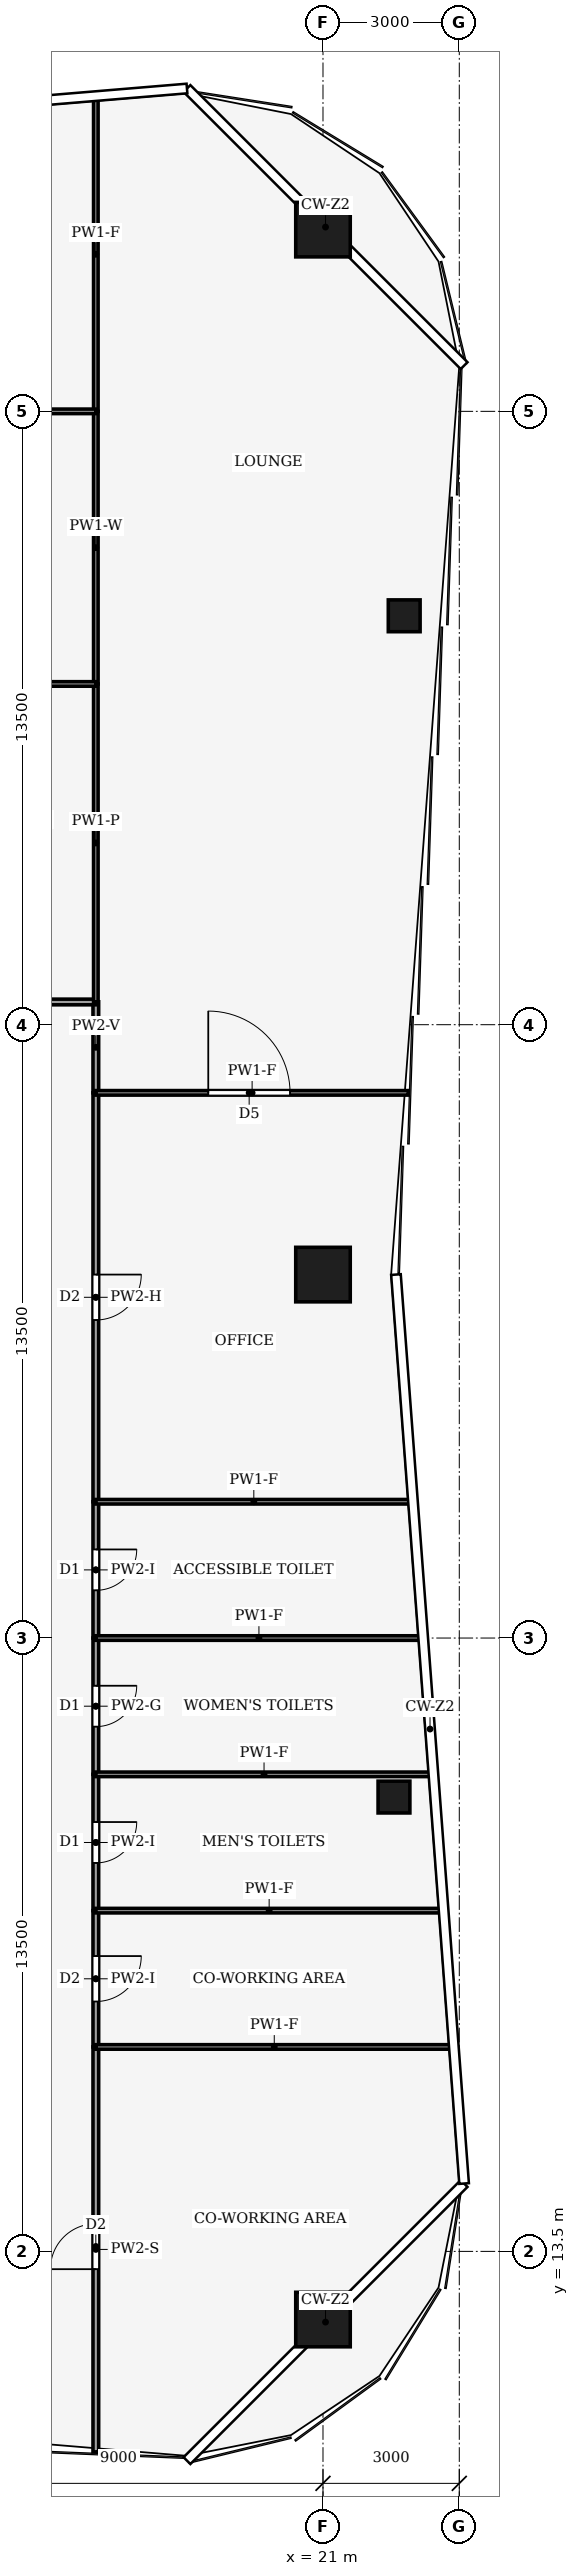
"""IFC4 building model, lengths in metres.
Left out: names, types, materials, properties, quantities, classifications, styles, units other than length and angle.
Written with IfcOpenShell. Run it as: python <this file> out.ifc"""

import sys

from ifc_helpers import new_model, si_unit, direction, frame, frame_2d, origin, origin_2d, place, context, subcontext, project, spatial, rectangle, hollow_rectangle, extrude, element, fill, save


model = new_model("IFC4")
c1 = context("Model", 3, precision=1e-05, world=origin(), true_north=direction((0.0, 1.0)))
c2 = subcontext(c1, "Body", "Model", "MODEL_VIEW")
j1 = project(units=[si_unit("LENGTHUNIT", "METRE"), si_unit("PLANEANGLEUNIT", "RADIAN")], contexts=[c1])
p1 = place(None, origin())
s1 = spatial("IfcSite", under=j1, at=p1, CompositionType="ELEMENT")
p2 = place(p1, origin())
s2 = spatial("IfcBuilding", under=s1, at=p2, CompositionType="ELEMENT")
p3 = place(p2, frame((0.0, 0.0, 154.0)))
s3 = spatial("IfcBuildingStorey", under=s2, at=p3, CompositionType="ELEMENT", Elevation=154.0)
for number, where, z_axis, x_axis in (
    (1, (21.0, 58.0, 0.0), (0.0, 0.0, 1.0), (1.0, 0.0, 0.0)),
    (2, (21.0, 35.0, 0.0), (0.0, 0.0, 1.0), (1.0, 0.0, 0.0)),
    (3, (21.0, 12.0, 0.0), (0.0, 0.0, 1.0), (1.0, 0.0, 0.0)),
):
    element("IfcColumn", number, at=place(p3, frame(where, z_axis=z_axis, x_axis=x_axis)), inside=s3, PredefinedType="COLUMN", context=c2, shape_type="SweptSolid", body=[
        extrude(hollow_rectangle(XDim=1.2, YDim=1.2, WallThickness=0.07, at=origin_2d()), origin(), (0.0, 0.0, 1.0), 4.0),
    ])
for number, where, z_axis, x_axis in (
    (4, (22.562, 23.5, 0.0), (0.0, 0.0, 1.0), (1.0, 0.0, 0.0)),
    (5, (22.788, 49.5, 0.0), (0.0, 0.0, 1.0), (1.0, 0.0, 0.0)),
):
    element("IfcColumn", number, at=place(p3, frame(where, z_axis=z_axis, x_axis=x_axis)), inside=s3, PredefinedType="COLUMN", context=c2, shape_type="SweptSolid", body=[
        extrude(hollow_rectangle(XDim=0.7, YDim=0.7, WallThickness=0.03, at=origin_2d()), origin(), (0.0, 0.0, 1.0), 4.0),
    ])
p4 = place(p3, frame((16.0, 9.087, 0.0), z_axis=(0.0, 0.0, 1.0), x_axis=(0.0, 1.0, 0.0)))
e6 = element("IfcWall", 6, at=p4, inside=s3, PredefinedType="PARTITIONING", context=c2, shape_type="SweptSolid", body=[
    extrude(rectangle(XDim=8.913, YDim=0.125, at=frame_2d((4.457, 0.0))), origin(), (0.0, 0.0, 1.0), 3.04),
])
p5 = place(p4, frame((4.022, 0.0, 0.0)))
e7 = element("IfcOpeningElement", 7, at=p5, cuts=e6, PredefinedType="OPENING", context=c2, shape_type="SweptSolid", body=[
    extrude(rectangle(XDim=1.0, YDim=2.1, at=frame_2d((0.5, 1.05))), frame((0.0, 0.073, 0.0), z_axis=(0.0, -1.0, 0.0), x_axis=(1.0, 0.0, 0.0)), (0.0, 0.0, 1.0), 0.145),
])
p6 = place(p3, frame((16.0, 21.0, 0.0), z_axis=(0.0, 0.0, 1.0), x_axis=(0.0, -1.0, 0.0)))
e8 = element("IfcWall", 8, at=p6, inside=s3, PredefinedType="PARTITIONING", context=c2, shape_type="SweptSolid", body=[
    extrude(rectangle(XDim=3.0, YDim=0.125, at=frame_2d((1.5, 0.0))), origin(), (0.0, 0.0, 1.0), 3.48),
])
p7 = place(p6, frame((1.0, 0.0, 0.0)))
e9 = element("IfcOpeningElement", 9, at=p7, cuts=e8, PredefinedType="OPENING", context=c2, shape_type="SweptSolid", body=[
    extrude(rectangle(XDim=1.0, YDim=2.1, at=frame_2d((0.5, 1.05))), frame((0.0, 0.073, 0.0), z_axis=(0.0, -1.0, 0.0), x_axis=(1.0, 0.0, 0.0)), (0.0, 0.0, 1.0), 0.145),
])
p8 = place(p3, frame((16.0, 24.0, 0.0), z_axis=(0.0, 0.0, 1.0), x_axis=(0.0, -1.0, 0.0)))
e10 = element("IfcWall", 10, at=p8, inside=s3, PredefinedType="PARTITIONING", context=c2, shape_type="SweptSolid", body=[
    extrude(rectangle(XDim=3.0, YDim=0.125, at=frame_2d((1.5, 0.0))), origin(), (0.0, 0.0, 1.0), 3.48),
])
p9 = place(p8, frame((1.05, 0.0, 0.0)))
e11 = element("IfcOpeningElement", 11, at=p9, cuts=e10, PredefinedType="OPENING", context=c2, shape_type="SweptSolid", body=[
    extrude(rectangle(XDim=0.9, YDim=2.1, at=frame_2d((0.45, 1.05))), frame((0.0, 0.073, 0.0), z_axis=(0.0, -1.0, 0.0), x_axis=(1.0, 0.0, 0.0)), (0.0, 0.0, 1.0), 0.145),
])
p10 = place(p3, frame((16.0, 27.0, 0.0), z_axis=(0.0, 0.0, 1.0), x_axis=(0.0, -1.0, 0.0)))
e12 = element("IfcWall", 12, at=p10, inside=s3, PredefinedType="PARTITIONING", context=c2, shape_type="SweptSolid", body=[
    extrude(rectangle(XDim=3.0, YDim=0.125, at=frame_2d((1.5, 0.0))), origin(), (0.0, 0.0, 1.0), 3.87),
])
p11 = place(p10, frame((1.05, 0.0, 0.0)))
e13 = element("IfcOpeningElement", 13, at=p11, cuts=e12, PredefinedType="OPENING", context=c2, shape_type="SweptSolid", body=[
    extrude(rectangle(XDim=0.9, YDim=2.1, at=frame_2d((0.45, 1.05))), frame((0.0, 0.073, 0.0), z_axis=(0.0, -1.0, 0.0), x_axis=(1.0, 0.0, 0.0)), (0.0, 0.0, 1.0), 0.145),
])
p12 = place(p3, frame((16.0, 30.0, 0.0), z_axis=(0.0, 0.0, 1.0), x_axis=(0.0, -1.0, 0.0)))
e14 = element("IfcWall", 14, at=p12, inside=s3, PredefinedType="PARTITIONING", context=c2, shape_type="SweptSolid", body=[
    extrude(rectangle(XDim=3.0, YDim=0.125, at=frame_2d((1.5, 0.0))), origin(), (0.0, 0.0, 1.0), 3.48),
])
p13 = place(p12, frame((1.05, 0.0, 0.0)))
e15 = element("IfcOpeningElement", 15, at=p13, cuts=e14, PredefinedType="OPENING", context=c2, shape_type="SweptSolid", body=[
    extrude(rectangle(XDim=0.9, YDim=2.1, at=frame_2d((0.45, 1.05))), frame((0.0, 0.073, 0.0), z_axis=(0.0, -1.0, 0.0), x_axis=(1.0, 0.0, 0.0)), (0.0, 0.0, 1.0), 0.145),
])
p14 = place(p3, frame((16.0, 39.0, 0.0), z_axis=(0.0, 0.0, 1.0), x_axis=(0.0, -1.0, 0.0)))
e16 = element("IfcWall", 16, at=p14, inside=s3, PredefinedType="PARTITIONING", context=c2, shape_type="SweptSolid", body=[
    extrude(rectangle(XDim=9.0, YDim=0.125, at=frame_2d((4.5, 0.0))), origin(), (0.0, 0.0, 1.0), 3.14),
])
p15 = place(p14, frame((4.0, 0.0, 0.0)))
e17 = element("IfcOpeningElement", 17, at=p15, cuts=e16, PredefinedType="OPENING", context=c2, shape_type="SweptSolid", body=[
    extrude(rectangle(XDim=1.0, YDim=2.1, at=frame_2d((0.5, 1.05))), frame((0.0, 0.073, 0.0), z_axis=(0.0, -1.0, 0.0), x_axis=(1.0, 0.0, 0.0)), (0.0, 0.0, 1.0), 0.145),
])
p16 = place(p3, frame((16.0, 39.0, 0.0), z_axis=(0.0, 0.0, 1.0), x_axis=(0.0, 1.0, 0.0)))
e18 = element("IfcWall", 18, at=p16, inside=s3, PredefinedType="PARTITIONING", context=c2, shape_type="SweptSolid", body=[
    extrude(rectangle(XDim=2.004, YDim=0.125, at=frame_2d((1.002, 0.0))), origin(), (0.0, 0.0, 1.0), 3.44),
])
p17 = place(p3, frame((16.0, 41.0, 0.0), z_axis=(0.0, 0.0, 1.0), x_axis=(-1.0, 0.0, 0.0)))
e19 = element("IfcWall", 19, at=p17, inside=s3, PredefinedType="PARTITIONING", context=c2, shape_type="SweptSolid", body=[
    extrude(rectangle(XDim=4.0, YDim=0.125, at=frame_2d((2.0, 0.0))), origin(), (0.0, 0.0, 1.0), 3.44),
])
p18 = place(p3, frame((23.855, 18.0, 0.0), z_axis=(0.0, 0.0, 1.0), x_axis=(-1.0, 0.0, 0.0)))
e20 = element("IfcWall", 20, at=p18, inside=s3, PredefinedType="PARTITIONING", context=c2, shape_type="SweptSolid", body=[
    extrude(rectangle(XDim=7.855, YDim=0.1, at=frame_2d((3.927, 0.0))), origin(), (0.0, 0.0, 1.0), 3.04),
])
p19 = place(p3, frame((23.63, 21.0, 0.0), z_axis=(0.0, 0.0, 1.0), x_axis=(-1.0, 0.0, 0.0)))
e21 = element("IfcWall", 21, at=p19, inside=s3, PredefinedType="PARTITIONING", context=c2, shape_type="SweptSolid", body=[
    extrude(rectangle(XDim=7.63, YDim=0.1, at=frame_2d((3.815, 0.0))), origin(), (0.0, 0.0, 1.0), 3.04),
])
p20 = place(p3, frame((23.405, 24.0, 0.0), z_axis=(0.0, 0.0, 1.0), x_axis=(-1.0, 0.0, 0.0)))
e22 = element("IfcWall", 22, at=p20, inside=s3, PredefinedType="PARTITIONING", context=c2, shape_type="SweptSolid", body=[
    extrude(rectangle(XDim=7.405, YDim=0.1, at=frame_2d((3.703, 0.0))), origin(), (0.0, 0.0, 1.0), 3.04),
])
p21 = place(p3, frame((23.18, 27.0, 0.0), z_axis=(0.0, 0.0, 1.0), x_axis=(-1.0, 0.0, 0.0)))
e23 = element("IfcWall", 23, at=p21, inside=s3, PredefinedType="PARTITIONING", context=c2, shape_type="SweptSolid", body=[
    extrude(rectangle(XDim=7.18, YDim=0.1, at=frame_2d((3.59, 0.0))), origin(), (0.0, 0.0, 1.0), 3.04),
])
p22 = place(p3, frame((22.955, 30.0, 0.0), z_axis=(0.0, 0.0, 1.0), x_axis=(-1.0, 0.0, 0.0)))
e24 = element("IfcWall", 24, at=p22, inside=s3, PredefinedType="PARTITIONING", context=c2, shape_type="SweptSolid", body=[
    extrude(rectangle(XDim=6.955, YDim=0.1, at=frame_2d((3.478, 0.0))), origin(), (0.0, 0.0, 1.0), 3.04),
])
p23 = place(p3, frame((16.0, 39.0, 0.0), z_axis=(0.0, 0.0, 1.0), x_axis=(1.0, 0.0, 0.0)))
e25 = element("IfcWall", 25, at=p23, inside=s3, PredefinedType="PARTITIONING", context=c2, shape_type="SweptSolid", body=[
    extrude(rectangle(XDim=6.88, YDim=0.1, at=frame_2d((3.44, 0.0))), origin(), (0.0, 0.0, 1.0), 3.04),
])
p24 = place(p23, frame((2.475, 0.0, 0.0)))
e26 = element("IfcOpeningElement", 26, at=p24, cuts=e25, PredefinedType="OPENING", context=c2, shape_type="SweptSolid", body=[
    extrude(rectangle(XDim=1.8, YDim=2.1, at=frame_2d((0.9, 1.05))), frame((0.0, 0.06, 0.0), z_axis=(0.0, -1.0, 0.0), x_axis=(1.0, 0.0, 0.0)), (0.0, 0.0, 1.0), 0.12),
])
p25 = place(p3, frame((16.0, 48.0, 0.0), z_axis=(0.0, 0.0, 1.0), x_axis=(0.0, -1.0, 0.0)))
e27 = element("IfcWall", 27, at=p25, inside=s3, PredefinedType="PARTITIONING", context=c2, shape_type="SweptSolid", body=[
    extrude(rectangle(XDim=7.0, YDim=0.1, at=frame_2d((3.5, 0.0))), origin(), (0.0, 0.0, 1.0), 3.44),
])
p26 = place(p3, frame((16.0, 54.0, 0.0), z_axis=(0.0, 0.0, 1.0), x_axis=(0.0, -1.0, 0.0)))
e28 = element("IfcWall", 28, at=p26, inside=s3, PredefinedType="PARTITIONING", context=c2, shape_type="SweptSolid", body=[
    extrude(rectangle(XDim=6.0, YDim=0.1, at=frame_2d((3.0, 0.0))), origin(), (0.0, 0.0, 1.0), 3.24),
])
p27 = place(p3, frame((16.0, 60.913, 0.0), z_axis=(0.0, 0.0, 1.0), x_axis=(0.0, -1.0, 0.0)))
e29 = element("IfcWall", 29, at=p27, inside=s3, PredefinedType="PARTITIONING", context=c2, shape_type="SweptSolid", body=[
    extrude(rectangle(XDim=6.913, YDim=0.1, at=frame_2d((3.457, 0.0))), origin(), (0.0, 0.0, 1.0), 3.04),
])
p28 = place(p3, frame((16.0, 48.0, 0.0), z_axis=(0.0, 0.0, 1.0), x_axis=(-1.0, 0.0, 0.0)))
e30 = element("IfcWall", 30, at=p28, inside=s3, PredefinedType="PARTITIONING", context=c2, shape_type="SweptSolid", body=[
    extrude(rectangle(XDim=4.004, YDim=0.1, at=frame_2d((2.002, 0.0))), origin(), (0.0, 0.0, 1.0), 3.87),
])
p29 = place(p3, frame((6.0, 54.0, 0.0), z_axis=(0.0, 0.0, 1.0), x_axis=(1.0, 0.0, 0.0)))
e31 = element("IfcWall", 31, at=p29, inside=s3, PredefinedType="PARTITIONING", context=c2, shape_type="SweptSolid", body=[
    extrude(rectangle(XDim=10.0, YDim=0.1, at=frame_2d((5.0, 0.0))), origin(), (0.0, 0.0, 1.0), 3.44),
])
p30 = place(p29, frame((4.5, 0.0, 0.0)))
e32 = element("IfcOpeningElement", 32, at=p30, cuts=e31, PredefinedType="OPENING", context=c2, shape_type="SweptSolid", body=[
    extrude(rectangle(XDim=1.0, YDim=2.1, at=frame_2d((0.5, 1.05))), frame((0.0, 0.06, 0.0), z_axis=(0.0, -1.0, 0.0), x_axis=(1.0, 0.0, 0.0)), (0.0, 0.0, 1.0), 0.12),
])
p31 = place(p5, origin())
e33 = element("IfcDoor", 33, at=p31, inside=s3, OperationType="SINGLE_SWING_RIGHT", PredefinedType="DOOR", context=c2, shape_type="SweptSolid", body=[
    extrude(rectangle(XDim=1.0, YDim=2.1, at=frame_2d((0.5, 1.05))), frame((0.0, 0.025, 0.0), z_axis=(0.0, -1.0, 0.0), x_axis=(1.0, 0.0, 0.0)), (0.0, 0.0, 1.0), 0.05),
])
fill(e7, e33)
p32 = place(p7, origin())
e34 = element("IfcDoor", 34, at=p32, inside=s3, OperationType="SINGLE_SWING_RIGHT", PredefinedType="DOOR", context=c2, shape_type="SweptSolid", body=[
    extrude(rectangle(XDim=1.0, YDim=2.1, at=frame_2d((0.5, 1.05))), frame((0.0, 0.025, 0.0), z_axis=(0.0, -1.0, 0.0), x_axis=(1.0, 0.0, 0.0)), (0.0, 0.0, 1.0), 0.05),
])
fill(e9, e34)
p33 = place(p9, origin())
e35 = element("IfcDoor", 35, at=p33, inside=s3, OperationType="SINGLE_SWING_LEFT", PredefinedType="DOOR", context=c2, shape_type="SweptSolid", body=[
    extrude(rectangle(XDim=0.9, YDim=2.1, at=frame_2d((0.45, 1.05))), frame((0.0, 0.025, 0.0), z_axis=(0.0, -1.0, 0.0), x_axis=(1.0, 0.0, 0.0)), (0.0, 0.0, 1.0), 0.05),
])
fill(e11, e35)
p34 = place(p11, origin())
e36 = element("IfcDoor", 36, at=p34, inside=s3, OperationType="SINGLE_SWING_RIGHT", PredefinedType="DOOR", context=c2, shape_type="SweptSolid", body=[
    extrude(rectangle(XDim=0.9, YDim=2.1, at=frame_2d((0.45, 1.05))), frame((0.0, 0.025, 0.0), z_axis=(0.0, -1.0, 0.0), x_axis=(1.0, 0.0, 0.0)), (0.0, 0.0, 1.0), 0.05),
])
fill(e13, e36)
p35 = place(p13, origin())
e37 = element("IfcDoor", 37, at=p35, inside=s3, OperationType="SINGLE_SWING_LEFT", PredefinedType="DOOR", context=c2, shape_type="SweptSolid", body=[
    extrude(rectangle(XDim=0.9, YDim=2.1, at=frame_2d((0.45, 1.05))), frame((0.0, 0.025, 0.0), z_axis=(0.0, -1.0, 0.0), x_axis=(1.0, 0.0, 0.0)), (0.0, 0.0, 1.0), 0.05),
])
fill(e15, e37)
p36 = place(p15, origin())
e38 = element("IfcDoor", 38, at=p36, inside=s3, OperationType="SINGLE_SWING_RIGHT", PredefinedType="DOOR", context=c2, shape_type="SweptSolid", body=[
    extrude(rectangle(XDim=1.0, YDim=2.1, at=frame_2d((0.5, 1.05))), frame((0.0, 0.025, 0.0), z_axis=(0.0, -1.0, 0.0), x_axis=(1.0, 0.0, 0.0)), (0.0, 0.0, 1.0), 0.05),
])
fill(e17, e38)
p37 = place(p24, origin())
e39 = element("IfcDoor", 39, at=p37, inside=s3, OperationType="DOUBLE_DOOR_SINGLE_SWING", PredefinedType="DOOR", context=c2, shape_type="SweptSolid", body=[
    extrude(rectangle(XDim=1.8, YDim=2.1, at=frame_2d((0.9, 1.05))), frame((0.0, 0.025, 0.0), z_axis=(0.0, -1.0, 0.0), x_axis=(1.0, 0.0, 0.0)), (0.0, 0.0, 1.0), 0.05),
])
fill(e26, e39)
save(model, sys.argv[1])
